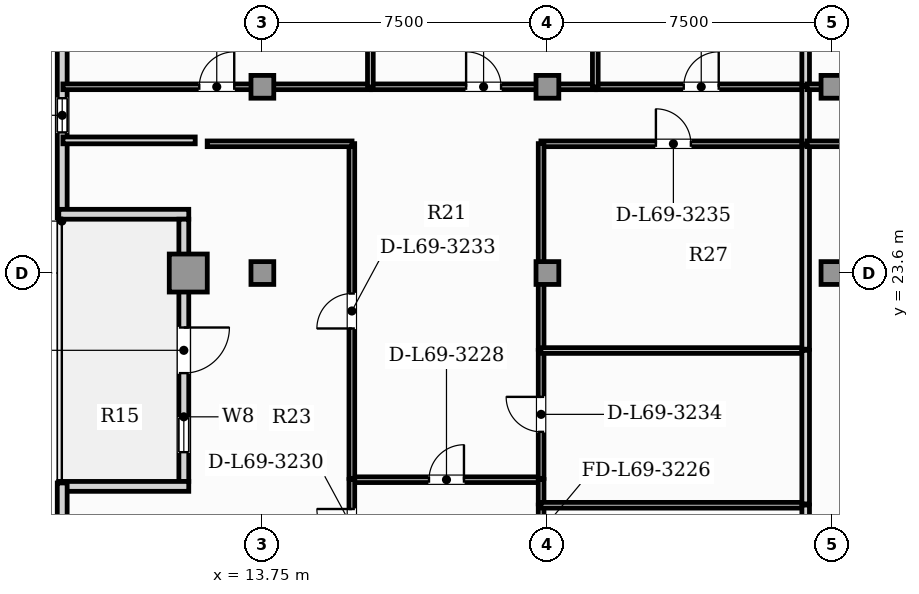
"""IFC4 building model, lengths in metres.
Left out: names, types, materials, properties, quantities, classifications, styles, units other than length and angle.
Written with IfcOpenShell. Run it as: python <this file> out.ifc"""

import sys

from ifc_helpers import new_model, si_unit, direction, frame, frame_2d, origin, origin_2d, place, context, subcontext, project, spatial, rectangle, hollow_rectangle, extrude, element, fill, save


model = new_model("IFC4")
c1 = context("Model", 3, precision=1e-05, world=origin(), true_north=direction((0.0, 1.0)))
c2 = subcontext(c1, "Body", "Model", "MODEL_VIEW")
j1 = project(units=[si_unit("LENGTHUNIT", "METRE"), si_unit("PLANEANGLEUNIT", "RADIAN")], contexts=[c1])
p1 = place(None, origin())
s1 = spatial("IfcSite", under=j1, at=p1, CompositionType="ELEMENT")
p2 = place(p1, origin())
s2 = spatial("IfcBuilding", under=s1, at=p2, CompositionType="ELEMENT")
p3 = place(p2, frame((0.0, 0.0, 281.05)))
s3 = spatial("IfcBuildingStorey", under=s2, at=p3, CompositionType="ELEMENT", Elevation=281.05)
p4 = place(p3, frame((11.8, 23.6, 0.0), z_axis=(0.0, 0.0, 1.0), x_axis=(1.0, 0.0, 0.0)))
e1 = element("IfcColumn", 1, at=p4, inside=s3, PredefinedType="USERDEFINED", context=c2, shape_type="SweptSolid", body=[
    extrude(hollow_rectangle(XDim=1.0, YDim=1.0, WallThickness=0.06, at=origin_2d()), origin(), (0.0, 0.0, 1.0), 3.85),
])
for number, where, z_axis, x_axis in (
    (2, (13.75, 23.6, 0.0), (0.0, 0.0, 1.0), (1.0, 0.0, 0.0)),
    (3, (21.25, 23.6, 0.0), (0.0, 0.0, 1.0), (1.0, 0.0, 0.0)),
    (4, (28.75, 23.6, 0.0), (0.0, 0.0, 1.0), (1.0, 0.0, 0.0)),
    (5, (13.75, 28.5, 0.0), (0.0, 0.0, 1.0), (1.0, 0.0, 0.0)),
    (6, (21.25, 28.5, 0.0), (0.0, 0.0, 1.0), (1.0, 0.0, 0.0)),
    (7, (28.75, 28.5, 0.0), (0.0, 0.0, 1.0), (1.0, 0.0, 0.0)),
):
    element("IfcColumn", number, at=place(p3, frame(where, z_axis=z_axis, x_axis=x_axis)), inside=s3, PredefinedType="COLUMN", context=c2, shape_type="SweptSolid", body=[
        extrude(rectangle(XDim=0.6, YDim=0.6, at=origin_2d()), origin(), (0.0, 0.0, 1.0), 3.85),
    ])
p5 = place(p3, frame((8.483, 31.492, 0.0), z_axis=(0.0, 0.0, 1.0), x_axis=(0.0, -1.0, 0.0)))
e8 = element("IfcWall", 8, at=p5, inside=s3, PredefinedType="SOLIDWALL", context=c2, shape_type="SweptSolid", body=[
    extrude(rectangle(XDim=6.436, YDim=0.26, at=frame_2d((3.218, 0.0))), origin(), (0.0, 0.0, 1.0), 3.65),
])
p6 = place(p5, frame((3.292, 0.0, 0.95)))
e9 = element("IfcOpeningElement", 9, at=p6, cuts=e8, PredefinedType="OPENING", context=c2, shape_type="SweptSolid", body=[
    extrude(rectangle(XDim=0.9, YDim=1.5, at=frame_2d((0.45, 0.75))), frame((0.0, 0.14, 0.0), z_axis=(0.0, -1.0, 0.0), x_axis=(1.0, 0.0, 0.0)), (0.0, 0.0, 1.0), 0.28),
])
p7 = place(p3, frame((8.393, 25.146, 0.0), z_axis=(0.0, 0.0, 1.0), x_axis=(1.0, 0.0, 0.0)))
e10 = element("IfcWall", 10, at=p7, inside=s3, PredefinedType="SOLIDWALL", context=c2, shape_type="SweptSolid", body=[
    extrude(rectangle(XDim=3.42, YDim=0.26, at=frame_2d((1.71, 0.0))), origin(), (0.0, 0.0, 1.0), 3.65),
])
p8 = place(p3, frame((11.683, 25.016, 0.0), z_axis=(0.0, 0.0, 1.0), x_axis=(0.0, -1.0, 0.0)))
e11 = element("IfcWall", 11, at=p8, inside=s3, PredefinedType="SOLIDWALL", context=c2, shape_type="SweptSolid", body=[
    extrude(rectangle(XDim=6.9, YDim=0.26, at=frame_2d((3.45, 0.0))), origin(), (0.0, 0.0, 1.0), 3.19),
])
p9 = place(p8, frame((2.85, 0.0, 0.0)))
e12 = element("IfcOpeningElement", 12, at=p9, cuts=e11, PredefinedType="OPENING", context=c2, shape_type="SweptSolid", body=[
    extrude(rectangle(XDim=1.2, YDim=2.2, at=frame_2d((0.6, 1.1))), frame((0.0, 0.14, 0.0), z_axis=(0.0, -1.0, 0.0), x_axis=(1.0, 0.0, 0.0)), (0.0, 0.0, 1.0), 0.28),
])
p10 = place(p8, frame((5.23, 0.0, 0.85)))
e13 = element("IfcOpeningElement", 13, at=p10, cuts=e11, PredefinedType="OPENING", context=c2, shape_type="SweptSolid", body=[
    extrude(rectangle(XDim=0.9, YDim=1.4, at=frame_2d((0.45, 0.7))), frame((0.0, 0.14, 0.0), z_axis=(0.0, -1.0, 0.0), x_axis=(1.0, 0.0, 0.0)), (0.0, 0.0, 1.0), 0.28),
])
p11 = place(p3, frame((11.813, 17.986, 0.0), z_axis=(0.0, 0.0, 1.0), x_axis=(-1.0, 0.0, 0.0)))
e14 = element("IfcWall", 14, at=p11, inside=s3, PredefinedType="SOLIDWALL", context=c2, shape_type="SweptSolid", body=[
    extrude(rectangle(XDim=3.42, YDim=0.26, at=frame_2d((1.71, 0.0))), origin(), (0.0, 0.0, 1.0), 3.65),
])
p12 = place(p3, frame((8.483, 18.076, 0.0), z_axis=(0.0, 0.0, 1.0), x_axis=(0.0, -1.0, 0.0)))
e15 = element("IfcWall", 15, at=p12, inside=s3, PredefinedType="SOLIDWALL", context=c2, shape_type="SweptSolid", body=[
    extrude(rectangle(XDim=14.836, YDim=0.26, at=frame_2d((7.418, 0.0))), origin(), (0.0, 0.0, 1.0), 3.65),
])
p13 = place(p12, frame((8.936, 0.0, 0.85)))
e16 = element("IfcOpeningElement", 16, at=p13, cuts=e15, PredefinedType="OPENING", context=c2, shape_type="SweptSolid", body=[
    extrude(rectangle(XDim=2.1, YDim=2.05, at=frame_2d((1.05, 1.025))), frame((0.0, 0.14, 0.0), z_axis=(0.0, -1.0, 0.0), x_axis=(1.0, 0.0, 0.0)), (0.0, 0.0, 1.0), 0.28),
])
p14 = place(p3, frame((16.099, 18.162, 0.0), z_axis=(0.0, 0.0, 1.0), x_axis=(1.0, 0.0, 0.0)))
e17 = element("IfcWall", 17, at=p14, inside=s3, PredefinedType="PARTITIONING", context=c2, shape_type="SweptSolid", body=[
    extrude(rectangle(XDim=4.99, YDim=0.15, at=frame_2d((2.495, 0.0))), origin(), (0.0, 0.0, 1.0), 3.65),
])
p15 = place(p14, frame((2.035, 0.0, 0.0)))
e18 = element("IfcOpeningElement", 18, at=p15, cuts=e17, PredefinedType="OPENING", context=c2, shape_type="SweptSolid", body=[
    extrude(rectangle(XDim=0.92, YDim=2.1, at=frame_2d((0.46, 1.05))), frame((0.0, 0.085, 0.0), z_axis=(0.0, -1.0, 0.0), x_axis=(1.0, 0.0, 0.0)), (0.0, 0.0, 1.0), 0.17),
])
p16 = place(p3, frame((16.104, 15.695, 0.0), z_axis=(0.0, 0.0, 1.0), x_axis=(0.0, 1.0, 0.0)))
e19 = element("IfcWall", 19, at=p16, inside=s3, PredefinedType="PARTITIONING", context=c2, shape_type="SweptSolid", body=[
    extrude(rectangle(XDim=2.472, YDim=0.15, at=frame_2d((1.236, 0.0))), origin(), (0.0, 0.0, 1.0), 3.65),
])
p17 = place(p16, frame((0.776, 0.0, 0.0)))
e20 = element("IfcOpeningElement", 20, at=p17, cuts=e19, PredefinedType="OPENING", context=c2, shape_type="SweptSolid", body=[
    extrude(rectangle(XDim=0.92, YDim=2.1, at=frame_2d((0.46, 1.05))), frame((0.0, 0.085, 0.0), z_axis=(0.0, -1.0, 0.0), x_axis=(1.0, 0.0, 0.0)), (0.0, 0.0, 1.0), 0.17),
])
p18 = place(p3, frame((21.084, 15.695, 0.0), z_axis=(0.0, 0.0, 1.0), x_axis=(0.0, 1.0, 0.0)))
e21 = element("IfcWall", 21, at=p18, inside=s3, PredefinedType="PARTITIONING", context=c2, shape_type="SweptSolid", body=[
    extrude(rectangle(XDim=1.8, YDim=0.15, at=frame_2d((0.9, 0.0))), origin(), (0.0, 0.0, 1.0), 3.295),
])
p19 = place(p18, frame((0.44, 0.0, 0.0)))
e22 = element("IfcOpeningElement", 22, at=p19, cuts=e21, PredefinedType="OPENING", context=c2, shape_type="SweptSolid", body=[
    extrude(rectangle(XDim=0.92, YDim=2.1, at=frame_2d((0.46, 1.05))), frame((0.0, 0.085, 0.0), z_axis=(0.0, -1.0, 0.0), x_axis=(1.0, 0.0, 0.0)), (0.0, 0.0, 1.0), 0.17),
])
p20 = place(p3, frame((21.084, 17.525, 0.0), z_axis=(0.0, 0.0, 1.0), x_axis=(0.0, 1.0, 0.0)))
e23 = element("IfcWall", 23, at=p20, inside=s3, PredefinedType="PARTITIONING", context=c2, shape_type="SweptSolid", body=[
    extrude(rectangle(XDim=0.642, YDim=0.15, at=frame_2d((0.321, 0.0))), origin(), (0.0, 0.0, 1.0), 3.65),
])
p21 = place(p3, frame((16.104, 18.197, 0.0), z_axis=(0.0, 0.0, 1.0), x_axis=(0.0, 1.0, 0.0)))
e24 = element("IfcWall", 24, at=p21, inside=s3, PredefinedType="PARTITIONING", context=c2, shape_type="SweptSolid", body=[
    extrude(rectangle(XDim=8.808, YDim=0.15, at=frame_2d((4.404, 0.0))), origin(), (0.0, 0.0, 1.0), 3.65),
])
p22 = place(p21, frame((3.944, 0.0, 0.0)))
e25 = element("IfcOpeningElement", 25, at=p22, cuts=e24, PredefinedType="OPENING", context=c2, shape_type="SweptSolid", body=[
    extrude(rectangle(XDim=0.92, YDim=2.1, at=frame_2d((0.46, 1.05))), frame((0.0, 0.085, 0.0), z_axis=(0.0, -1.0, 0.0), x_axis=(1.0, 0.0, 0.0)), (0.0, 0.0, 1.0), 0.17),
])
p23 = place(p3, frame((12.298, 27.0, 0.0), z_axis=(0.0, 0.0, 1.0), x_axis=(1.0, 0.0, 0.0)))
e26 = element("IfcWall", 26, at=p23, inside=s3, PredefinedType="PARTITIONING", context=c2, shape_type="SweptSolid", body=[
    extrude(rectangle(XDim=3.811, YDim=0.15, at=frame_2d((1.906, 0.0))), origin(), (0.0, 0.0, 1.0), 3.65),
])
p24 = place(p3, frame((21.084, 18.197, 0.0), z_axis=(0.0, 0.0, 1.0), x_axis=(0.0, 1.0, 0.0)))
e27 = element("IfcWall", 27, at=p24, inside=s3, PredefinedType="PARTITIONING", context=c2, shape_type="SweptSolid", body=[
    extrude(rectangle(XDim=3.369, YDim=0.15, at=frame_2d((1.685, 0.0))), origin(), (0.0, 0.0, 1.0), 3.295),
])
p25 = place(p24, frame((1.224, 0.0, 0.0)))
e28 = element("IfcOpeningElement", 28, at=p25, cuts=e27, PredefinedType="OPENING", context=c2, shape_type="SweptSolid", body=[
    extrude(rectangle(XDim=0.92, YDim=2.1, at=frame_2d((0.46, 1.05))), frame((0.0, 0.085, 0.0), z_axis=(0.0, -1.0, 0.0), x_axis=(1.0, 0.0, 0.0)), (0.0, 0.0, 1.0), 0.17),
])
p26 = place(p3, frame((21.079, 27.0, 0.0), z_axis=(0.0, 0.0, 1.0), x_axis=(1.0, 0.0, 0.0)))
e29 = element("IfcWall", 29, at=p26, inside=s3, PredefinedType="PARTITIONING", context=c2, shape_type="SweptSolid", body=[
    extrude(rectangle(XDim=6.971, YDim=0.15, at=frame_2d((3.485, 0.0))), origin(), (0.0, 0.0, 1.0), 3.65),
])
p27 = place(p26, frame((3.025, 0.0, 0.0)))
e30 = element("IfcOpeningElement", 30, at=p27, cuts=e29, PredefinedType="OPENING", context=c2, shape_type="SweptSolid", body=[
    extrude(rectangle(XDim=0.92, YDim=2.1, at=frame_2d((0.46, 1.05))), frame((0.0, 0.085, 0.0), z_axis=(0.0, -1.0, 0.0), x_axis=(1.0, 0.0, 0.0)), (0.0, 0.0, 1.0), 0.17),
])
p28 = place(p3, frame((21.084, 21.596, 0.0), z_axis=(0.0, 0.0, 1.0), x_axis=(0.0, 1.0, 0.0)))
e31 = element("IfcWall", 31, at=p28, inside=s3, PredefinedType="PARTITIONING", context=c2, shape_type="SweptSolid", body=[
    extrude(rectangle(XDim=5.409, YDim=0.15, at=frame_2d((2.705, 0.0))), origin(), (0.0, 0.0, 1.0), 3.295),
])
p29 = place(p3, frame((8.503, 28.5, 0.0), z_axis=(0.0, 0.0, 1.0), x_axis=(1.0, 0.0, 0.0)))
e32 = element("IfcWall", 32, at=p29, inside=s3, PredefinedType="PARTITIONING", context=c2, shape_type="SweptSolid", body=[
    extrude(rectangle(XDim=8.094, YDim=0.15, at=frame_2d((4.047, 0.0))), origin(), (0.0, 0.0, 1.0), 3.117),
])
p30 = place(p29, frame((3.587, 0.0, 0.0)))
e33 = element("IfcOpeningElement", 33, at=p30, cuts=e32, PredefinedType="OPENING", context=c2, shape_type="SweptSolid", body=[
    extrude(rectangle(XDim=0.92, YDim=2.1, at=frame_2d((0.46, 1.05))), frame((0.0, 0.085, 0.0), z_axis=(0.0, -1.0, 0.0), x_axis=(1.0, 0.0, 0.0)), (0.0, 0.0, 1.0), 0.17),
])
p31 = place(p3, frame((16.626, 28.5, 0.0), z_axis=(0.0, 0.0, 1.0), x_axis=(1.0, 0.0, 0.0)))
e34 = element("IfcWall", 34, at=p31, inside=s3, PredefinedType="PARTITIONING", context=c2, shape_type="SweptSolid", body=[
    extrude(rectangle(XDim=5.888, YDim=0.15, at=frame_2d((2.944, 0.0))), origin(), (0.0, 0.0, 1.0), 3.117),
])
p32 = place(p31, frame((2.484, 0.0, 0.0)))
e35 = element("IfcOpeningElement", 35, at=p32, cuts=e34, PredefinedType="OPENING", context=c2, shape_type="SweptSolid", body=[
    extrude(rectangle(XDim=0.92, YDim=2.1, at=frame_2d((0.46, 1.05))), frame((0.0, 0.085, 0.0), z_axis=(0.0, -1.0, 0.0), x_axis=(1.0, 0.0, 0.0)), (0.0, 0.0, 1.0), 0.17),
])
p33 = place(p3, frame((22.545, 28.5, 0.0), z_axis=(0.0, 0.0, 1.0), x_axis=(1.0, 0.0, 0.0)))
e36 = element("IfcWall", 36, at=p33, inside=s3, PredefinedType="PARTITIONING", context=c2, shape_type="SweptSolid", body=[
    extrude(rectangle(XDim=5.506, YDim=0.15, at=frame_2d((2.753, 0.0))), origin(), (0.0, 0.0, 1.0), 3.117),
])
p34 = place(p33, frame((2.293, 0.0, 0.0)))
e37 = element("IfcOpeningElement", 37, at=p34, cuts=e36, PredefinedType="OPENING", context=c2, shape_type="SweptSolid", body=[
    extrude(rectangle(XDim=0.92, YDim=2.1, at=frame_2d((0.46, 1.05))), frame((0.0, 0.085, 0.0), z_axis=(0.0, -1.0, 0.0), x_axis=(1.0, 0.0, 0.0)), (0.0, 0.0, 1.0), 0.17),
])
p35 = place(p3, frame((28.045, 26.995, 0.0), z_axis=(0.0, 0.0, 1.0), x_axis=(0.0, 1.0, 0.0)))
e38 = element("IfcWall", 38, at=p35, inside=s3, PredefinedType="PARTITIONING", context=c2, shape_type="SweptSolid", body=[
    extrude(rectangle(XDim=1.51, YDim=0.2, at=frame_2d((0.755, 0.0))), origin(), (0.0, 0.0, 1.0), 3.65),
])
p36 = place(p3, frame((21.079, 17.49, 0.0), z_axis=(0.0, 0.0, 1.0), x_axis=(1.0, 0.0, 0.0)))
e39 = element("IfcWall", 39, at=p36, inside=s3, PredefinedType="PARTITIONING", context=c2, shape_type="SweptSolid", body=[
    extrude(rectangle(XDim=6.971, YDim=0.15, at=frame_2d((3.485, 0.0))), origin(), (0.0, 0.0, 1.0), 3.65),
])
p37 = place(p3, frame((28.045, 15.695, 0.0), z_axis=(0.0, 0.0, 1.0), x_axis=(0.0, 1.0, 0.0)))
e40 = element("IfcWall", 40, at=p37, inside=s3, PredefinedType="PARTITIONING", context=c2, shape_type="SweptSolid", body=[
    extrude(rectangle(XDim=1.8, YDim=0.2, at=frame_2d((0.9, 0.0))), origin(), (0.0, 0.0, 1.0), 3.65),
])
p38 = place(p3, frame((21.079, 21.561, 0.0), z_axis=(0.0, 0.0, 1.0), x_axis=(1.0, 0.0, 0.0)))
e41 = element("IfcWall", 41, at=p38, inside=s3, PredefinedType="PARTITIONING", context=c2, shape_type="SweptSolid", body=[
    extrude(rectangle(XDim=6.971, YDim=0.15, at=frame_2d((3.485, 0.0))), origin(), (0.0, 0.0, 1.0), 3.65),
])
p39 = place(p3, frame((28.045, 17.525, 0.0), z_axis=(0.0, 0.0, 1.0), x_axis=(0.0, 1.0, 0.0)))
e42 = element("IfcWall", 42, at=p39, inside=s3, PredefinedType="PARTITIONING", context=c2, shape_type="SweptSolid", body=[
    extrude(rectangle(XDim=4.041, YDim=0.2, at=frame_2d((2.021, 0.0))), origin(), (0.0, 0.0, 1.0), 3.65),
])
p40 = place(p3, frame((28.045, 21.596, 0.0), z_axis=(0.0, 0.0, 1.0), x_axis=(0.0, 1.0, 0.0)))
e43 = element("IfcWall", 43, at=p40, inside=s3, PredefinedType="PARTITIONING", context=c2, shape_type="SweptSolid", body=[
    extrude(rectangle(XDim=5.369, YDim=0.2, at=frame_2d((2.685, 0.0))), origin(), (0.0, 0.0, 1.0), 3.65),
])
for number, where, z_axis, x_axis in (
    (44, (16.592, 28.495, 0.0), (0.0, 0.0, 1.0), (0.0, 1.0, 0.0)),
    (45, (22.51, 28.495, 0.0), (0.0, 0.0, 1.0), (0.0, 1.0, 0.0)),
):
    element("IfcWall", number, at=place(p3, frame(where, z_axis=z_axis, x_axis=x_axis)), inside=s3, PredefinedType="PARTITIONING", context=c2, shape_type="SweptSolid", body=[
        extrude(rectangle(XDim=6.088, YDim=0.15, at=frame_2d((3.044, 0.0))), origin(), (0.0, 0.0, 1.0), 3.65),
    ])
p41 = place(p3, frame((28.045, 28.535, 0.0), z_axis=(0.0, 0.0, 1.0), x_axis=(0.0, 1.0, 0.0)))
e46 = element("IfcWall", 46, at=p41, inside=s3, PredefinedType="PARTITIONING", context=c2, shape_type="SweptSolid", body=[
    extrude(rectangle(XDim=6.048, YDim=0.2, at=frame_2d((3.024, 0.0))), origin(), (0.0, 0.0, 1.0), 3.65),
])
p42 = place(p3, frame((28.08, 27.0, 0.0), z_axis=(0.0, 0.0, 1.0), x_axis=(1.0, 0.0, 0.0)))
e47 = element("IfcWall", 47, at=p42, inside=s3, PredefinedType="PARTITIONING", context=c2, shape_type="SweptSolid", body=[
    extrude(rectangle(XDim=7.552, YDim=0.15, at=frame_2d((3.776, 0.0))), origin(), (0.0, 0.0, 1.0), 3.65),
])
p43 = place(p3, frame((28.08, 28.5, 0.0), z_axis=(0.0, 0.0, 1.0), x_axis=(1.0, 0.0, 0.0)))
e48 = element("IfcWall", 48, at=p43, inside=s3, PredefinedType="PARTITIONING", context=c2, shape_type="SweptSolid", body=[
    extrude(rectangle(XDim=5.966, YDim=0.15, at=frame_2d((2.983, 0.0))), origin(), (0.0, 0.0, 1.0), 3.117),
])
p44 = place(p43, frame((2.523, 0.0, 0.0)))
e49 = element("IfcOpeningElement", 49, at=p44, cuts=e48, PredefinedType="OPENING", context=c2, shape_type="SweptSolid", body=[
    extrude(rectangle(XDim=0.92, YDim=2.1, at=frame_2d((0.46, 1.05))), frame((0.0, 0.085, 0.0), z_axis=(0.0, -1.0, 0.0), x_axis=(1.0, 0.0, 0.0)), (0.0, 0.0, 1.0), 0.17),
])
p45 = place(p3, frame((11.983, 27.09, 0.0), z_axis=(0.0, 0.0, 1.0), x_axis=(-1.0, 0.0, 0.0)))
e50 = element("IfcWall", 50, at=p45, inside=s3, PredefinedType="PARTITIONING", context=c2, shape_type="SweptSolid", body=[
    extrude(rectangle(XDim=3.48, YDim=0.18, at=frame_2d((1.74, 0.0))), origin(), (0.0, 0.0, 1.0), 3.65),
])
p46 = place(p9, frame((1.2, 0.0, 0.0), z_axis=(0.0, 0.0, 1.0), x_axis=(-1.0, 0.0, 0.0)))
e51 = element("IfcDoor", 51, at=p46, inside=s3, OperationType="SINGLE_SWING_RIGHT", PredefinedType="DOOR", context=c2, shape_type="SweptSolid", body=[
    extrude(rectangle(XDim=1.2, YDim=2.2, at=frame_2d((0.6, 1.1))), frame((0.0, 0.025, 0.0), z_axis=(0.0, -1.0, 0.0), x_axis=(1.0, 0.0, 0.0)), (0.0, 0.0, 1.0), 0.05),
])
fill(e12, e51)
p47 = place(p6, origin())
e52 = element("IfcWindow", 52, at=p47, inside=s3, PartitioningType="SINGLE_PANEL", PredefinedType="WINDOW", context=c2, shape_type="SweptSolid", body=[
    extrude(rectangle(XDim=0.9, YDim=1.5, at=frame_2d((0.45, 0.75))), frame((0.0, 0.03, 0.0), z_axis=(0.0, -1.0, 0.0), x_axis=(1.0, 0.0, 0.0)), (0.0, 0.0, 1.0), 0.06),
])
fill(e9, e52)
p48 = place(p10, origin())
e53 = element("IfcWindow", 53, at=p48, inside=s3, PartitioningType="SINGLE_PANEL", PredefinedType="WINDOW", context=c2, shape_type="SweptSolid", body=[
    extrude(rectangle(XDim=0.9, YDim=1.4, at=frame_2d((0.45, 0.7))), frame((0.0, 0.03, 0.0), z_axis=(0.0, -1.0, 0.0), x_axis=(1.0, 0.0, 0.0)), (0.0, 0.0, 1.0), 0.06),
])
fill(e13, e53)
p49 = place(p15, origin())
e54 = element("IfcDoor", 54, at=p49, inside=s3, OperationType="SINGLE_SWING_RIGHT", PredefinedType="DOOR", context=c2, shape_type="SweptSolid", body=[
    extrude(rectangle(XDim=0.92, YDim=2.1, at=frame_2d((0.46, 1.05))), frame((0.0, 0.025, 0.0), z_axis=(0.0, -1.0, 0.0), x_axis=(1.0, 0.0, 0.0)), (0.0, 0.0, 1.0), 0.05),
])
fill(e18, e54)
p50 = place(p17, origin())
e55 = element("IfcDoor", 55, at=p50, inside=s3, OperationType="SINGLE_SWING_RIGHT", PredefinedType="DOOR", context=c2, shape_type="SweptSolid", body=[
    extrude(rectangle(XDim=0.92, YDim=2.1, at=frame_2d((0.46, 1.05))), frame((0.0, 0.025, 0.0), z_axis=(0.0, -1.0, 0.0), x_axis=(1.0, 0.0, 0.0)), (0.0, 0.0, 1.0), 0.05),
])
fill(e20, e55)
p51 = place(p22, origin())
e56 = element("IfcDoor", 56, at=p51, inside=s3, OperationType="SINGLE_SWING_LEFT", PredefinedType="DOOR", context=c2, shape_type="SweptSolid", body=[
    extrude(rectangle(XDim=0.92, YDim=2.1, at=frame_2d((0.46, 1.05))), frame((0.0, 0.025, 0.0), z_axis=(0.0, -1.0, 0.0), x_axis=(1.0, 0.0, 0.0)), (0.0, 0.0, 1.0), 0.05),
])
fill(e25, e56)
p52 = place(p25, origin())
e57 = element("IfcDoor", 57, at=p52, inside=s3, OperationType="SINGLE_SWING_RIGHT", PredefinedType="DOOR", context=c2, shape_type="SweptSolid", body=[
    extrude(rectangle(XDim=0.92, YDim=2.1, at=frame_2d((0.46, 1.05))), frame((0.0, 0.025, 0.0), z_axis=(0.0, -1.0, 0.0), x_axis=(1.0, 0.0, 0.0)), (0.0, 0.0, 1.0), 0.05),
])
fill(e28, e57)
p53 = place(p27, origin())
e58 = element("IfcDoor", 58, at=p53, inside=s3, OperationType="SINGLE_SWING_LEFT", PredefinedType="DOOR", context=c2, shape_type="SweptSolid", body=[
    extrude(rectangle(XDim=0.92, YDim=2.1, at=frame_2d((0.46, 1.05))), frame((0.0, 0.025, 0.0), z_axis=(0.0, -1.0, 0.0), x_axis=(1.0, 0.0, 0.0)), (0.0, 0.0, 1.0), 0.05),
])
fill(e30, e58)
p54 = place(p30, origin())
e59 = element("IfcDoor", 59, at=p54, inside=s3, OperationType="SINGLE_SWING_RIGHT", PredefinedType="DOOR", context=c2, shape_type="SweptSolid", body=[
    extrude(rectangle(XDim=0.92, YDim=2.1, at=frame_2d((0.46, 1.05))), frame((0.0, 0.025, 0.0), z_axis=(0.0, -1.0, 0.0), x_axis=(1.0, 0.0, 0.0)), (0.0, 0.0, 1.0), 0.05),
])
fill(e33, e59)
p55 = place(p32, origin())
e60 = element("IfcDoor", 60, at=p55, inside=s3, OperationType="SINGLE_SWING_LEFT", PredefinedType="DOOR", context=c2, shape_type="SweptSolid", body=[
    extrude(rectangle(XDim=0.92, YDim=2.1, at=frame_2d((0.46, 1.05))), frame((0.0, 0.025, 0.0), z_axis=(0.0, -1.0, 0.0), x_axis=(1.0, 0.0, 0.0)), (0.0, 0.0, 1.0), 0.05),
])
fill(e35, e60)
p56 = place(p34, origin())
e61 = element("IfcDoor", 61, at=p56, inside=s3, OperationType="SINGLE_SWING_RIGHT", PredefinedType="DOOR", context=c2, shape_type="SweptSolid", body=[
    extrude(rectangle(XDim=0.92, YDim=2.1, at=frame_2d((0.46, 1.05))), frame((0.0, 0.025, 0.0), z_axis=(0.0, -1.0, 0.0), x_axis=(1.0, 0.0, 0.0)), (0.0, 0.0, 1.0), 0.05),
])
fill(e37, e61)
save(model, sys.argv[1])
